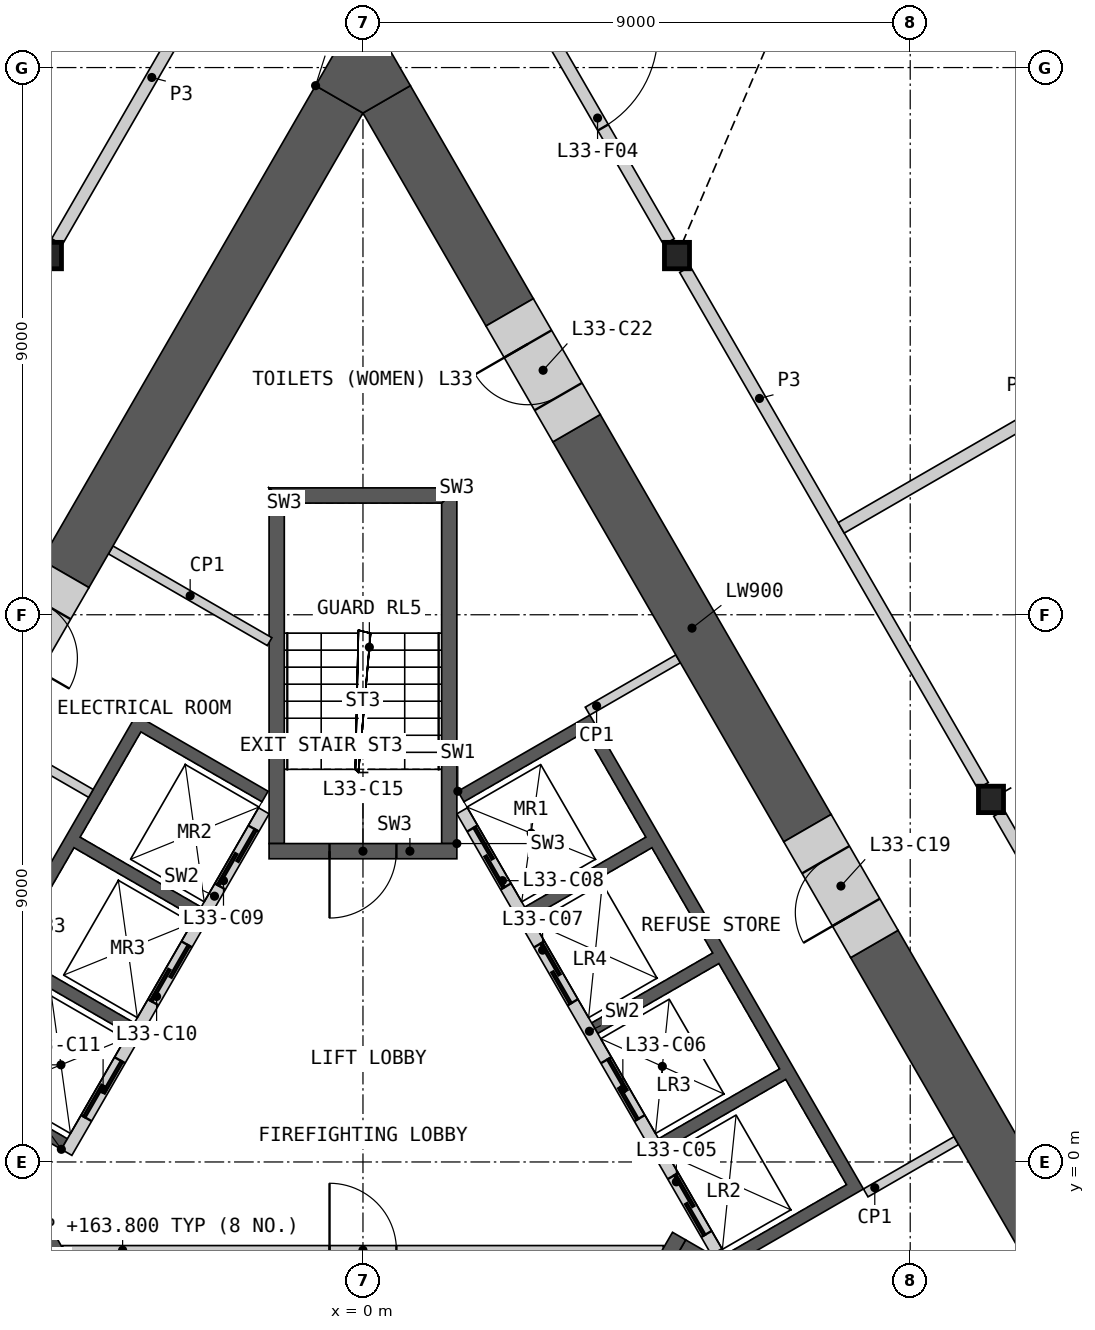
"""IFC4 building model, lengths in metres.
Left out: names, types, materials, properties, quantities, classifications, styles, units other than length and angle.
Written with IfcOpenShell. Run it as: python <this file> out.ifc"""

import sys

from ifc_helpers import new_model, si_unit, direction, frame, frame_2d, origin, origin_2d, place, context, subcontext, project, spatial, polyline, rectangle, i_section, outline, extrude, element, fill, save


model = new_model("IFC4")
c1 = context("Model", 3, precision=1e-05, world=origin(), true_north=direction((0.0, 1.0)))
c2 = subcontext(c1, "Body", "Model", "MODEL_VIEW")
j1 = project(units=[si_unit("LENGTHUNIT", "METRE"), si_unit("PLANEANGLEUNIT", "RADIAN")], contexts=[c1])
p1 = place(None, origin())
s1 = spatial("IfcSite", under=j1, at=p1, CompositionType="ELEMENT")
p2 = place(p1, origin())
s2 = spatial("IfcBuilding", under=s1, at=p2, CompositionType="ELEMENT")
p3 = place(p2, frame((0.0, 0.0, 154.2)))
s3 = spatial("IfcBuildingStorey", under=s2, at=p3, CompositionType="ELEMENT", Elevation=154.2)
for number, where, z_axis, x_axis in (
    (1, (-5.164, 14.908, 0.0), (0.0, 0.0, 1.0), (1.0, 0.0, 0.0)),
    (2, (10.328, 5.963, 0.0), (0.0, 0.0, 1.0), (1.0, 0.0, 0.0)),
    (3, (5.164, 14.908, 0.0), (0.0, 0.0, 1.0), (1.0, 0.0, 0.0)),
):
    element("IfcColumn", number, at=place(p3, frame(where, z_axis=z_axis, x_axis=x_axis)), inside=s3, PredefinedType="COLUMN", context=c2, shape_type="SweptSolid", body=[
        extrude(i_section(OverallWidth=0.412, OverallDepth=0.435, WebThickness=0.036, FlangeThickness=0.057, at=origin_2d()), origin(), (0.0, 0.0, 1.0), 10.0),
    ])
p4 = place(p3, origin())
e4 = element("IfcWall", 4, at=p4, inside=s3, PredefinedType="SHEAR", context=c2, shape_type="SweptSolid", body=[
    extrude(outline(polyline([(1.561, 6.097), (3.731, 7.35), (8.231, -0.444), (6.061, -1.697), (5.96, -1.524), (7.952, -0.374), (6.952, 1.358), (4.96, 0.208), (4.861, 0.381), (6.852, 1.531), (5.852, 3.263), (3.861, 2.113), (3.76, 2.287), (5.752, 3.437), (4.752, 5.169), (2.76, 4.019), (2.66, 4.192), (4.652, 5.342), (3.652, 7.074), (1.66, 5.924), (1.561, 6.097)])), origin(), (0.0, 0.0, 1.0), 9.6),
])
p5 = place(p3, frame((5.817, -1.476, 0.0), z_axis=(0.0, 0.0, 1.0), x_axis=(-0.500002616675, 0.866023893041, 0.0)))
e5 = element("IfcWall", 5, at=p5, inside=s3, PredefinedType="SOLIDWALL", context=c2, shape_type="SweptSolid", body=[
    extrude(rectangle(XDim=8.373, YDim=0.2, at=frame_2d((4.187, 0.0))), origin(), (0.0, 0.0, 1.0), 9.6),
])
p6 = place(p5, frame((0.337, 0.0, 0.0)))
e6 = element("IfcOpeningElement", 6, at=p6, cuts=e5, PredefinedType="OPENING", context=c2, shape_type="SweptSolid", body=[
    extrude(rectangle(XDim=1.1, YDim=2.1, at=frame_2d((0.55, 1.05))), frame((0.0, 0.11, 0.0), z_axis=(0.0, -1.0, 0.0), x_axis=(1.0, 0.0, 0.0)), (0.0, 0.0, 1.0), 0.22),
])
p7 = place(p5, frame((2.537, 0.0, 0.0)))
e7 = element("IfcOpeningElement", 7, at=p7, cuts=e5, PredefinedType="OPENING", context=c2, shape_type="SweptSolid", body=[
    extrude(rectangle(XDim=1.1, YDim=2.1, at=frame_2d((0.55, 1.05))), frame((0.0, 0.11, 0.0), z_axis=(0.0, -1.0, 0.0), x_axis=(1.0, 0.0, 0.0)), (0.0, 0.0, 1.0), 0.22),
])
p8 = place(p5, frame((4.737, 0.0, 0.0)))
e8 = element("IfcOpeningElement", 8, at=p8, cuts=e5, PredefinedType="OPENING", context=c2, shape_type="SweptSolid", body=[
    extrude(rectangle(XDim=1.1, YDim=2.1, at=frame_2d((0.55, 1.05))), frame((0.0, 0.11, 0.0), z_axis=(0.0, -1.0, 0.0), x_axis=(1.0, 0.0, 0.0)), (0.0, 0.0, 1.0), 0.22),
])
p9 = place(p5, frame((6.937, 0.0, 0.0)))
e9 = element("IfcOpeningElement", 9, at=p9, cuts=e5, PredefinedType="OPENING", context=c2, shape_type="SweptSolid", body=[
    extrude(rectangle(XDim=1.1, YDim=2.1, at=frame_2d((0.55, 1.05))), frame((0.0, 0.11, 0.0), z_axis=(0.0, -1.0, 0.0), x_axis=(1.0, 0.0, 0.0)), (0.0, 0.0, 1.0), 0.22),
])
p10 = place(p3, origin())
e10 = element("IfcWall", 10, at=p10, inside=s3, PredefinedType="SHEAR", context=c2, shape_type="SweptSolid", body=[
    extrude(outline(polyline([(-4.96, 0.208), (-7.131, 1.461), (-3.731, 7.35), (-1.561, 6.097), (-1.66, 5.924), (-3.652, 7.074), (-4.652, 5.342), (-2.66, 4.192), (-2.76, 4.019), (-4.752, 5.169), (-5.752, 3.437), (-3.76, 2.287), (-3.861, 2.113), (-5.852, 3.263), (-6.852, 1.531), (-4.861, 0.381), (-4.96, 0.208)])), origin(), (0.0, 0.0, 1.0), 9.6),
])
p11 = place(p3, frame((-1.631, 5.776, 0.0), z_axis=(0.0, 0.0, 1.0), x_axis=(-0.499992876559, -0.866029516466, 0.0)))
e11 = element("IfcWall", 11, at=p11, inside=s3, PredefinedType="SOLIDWALL", context=c2, shape_type="SweptSolid", body=[
    extrude(rectangle(XDim=6.486, YDim=0.2, at=frame_2d((3.243, 0.0))), origin(), (0.0, 0.0, 1.0), 9.6),
])
p12 = place(p11, frame((0.337, 0.0, 0.0)))
e12 = element("IfcOpeningElement", 12, at=p12, cuts=e11, PredefinedType="OPENING", context=c2, shape_type="SweptSolid", body=[
    extrude(rectangle(XDim=1.1, YDim=2.1, at=frame_2d((0.55, 1.05))), frame((0.0, 0.11, 0.0), z_axis=(0.0, -1.0, 0.0), x_axis=(1.0, 0.0, 0.0)), (0.0, 0.0, 1.0), 0.22),
])
p13 = place(p11, frame((2.537, 0.0, 0.0)))
e13 = element("IfcOpeningElement", 13, at=p13, cuts=e11, PredefinedType="OPENING", context=c2, shape_type="SweptSolid", body=[
    extrude(rectangle(XDim=1.1, YDim=2.1, at=frame_2d((0.55, 1.05))), frame((0.0, 0.11, 0.0), z_axis=(0.0, -1.0, 0.0), x_axis=(1.0, 0.0, 0.0)), (0.0, 0.0, 1.0), 0.22),
])
p14 = place(p11, frame((4.737, 0.0, 0.0)))
e14 = element("IfcOpeningElement", 14, at=p14, cuts=e11, PredefinedType="OPENING", context=c2, shape_type="SweptSolid", body=[
    extrude(rectangle(XDim=1.1, YDim=2.1, at=frame_2d((0.55, 1.05))), frame((0.0, 0.11, 0.0), z_axis=(0.0, -1.0, 0.0), x_axis=(1.0, 0.0, 0.0)), (0.0, 0.0, 1.0), 0.22),
])
p15 = place(p3, frame((-4.941, -1.45, 0.0), z_axis=(0.0, 0.0, 1.0), x_axis=(1.0, 0.0, 0.0)))
e15 = element("IfcWall", 15, at=p15, inside=s3, PredefinedType="PARTITIONING", context=c2, shape_type="SweptSolid", body=[
    extrude(rectangle(XDim=9.882, YDim=0.15, at=frame_2d((4.941, 0.0))), origin(), (0.0, 0.0, 1.0), 9.6),
])
p16 = place(p15, frame((4.391, 0.0, 0.0)))
e16 = element("IfcOpeningElement", 16, at=p16, cuts=e15, PredefinedType="OPENING", context=c2, shape_type="SweptSolid", body=[
    extrude(rectangle(XDim=1.1, YDim=2.1, at=frame_2d((0.55, 1.05))), frame((0.0, 0.085, 0.0), z_axis=(0.0, -1.0, 0.0), x_axis=(1.0, 0.0, 0.0)), (0.0, 0.0, 1.0), 0.17),
])
p17 = place(p3, frame((-5.199, -1.219, 0.0), z_axis=(0.0, 0.0, 1.0), x_axis=(0.499982516597, -0.866035497597, 0.0)))
e17 = element("IfcWall", 17, at=p17, inside=s3, PredefinedType="SHEAR", context=c2, shape_type="SweptSolid", body=[
    extrude(rectangle(XDim=3.088, YDim=0.25, at=frame_2d((1.544, 0.0))), origin(), (0.0, 0.0, 1.0), 9.6),
])
p18 = place(p17, frame((0.994, 0.0, 0.0)))
e18 = element("IfcOpeningElement", 18, at=p18, cuts=e17, PredefinedType="OPENING", context=c2, shape_type="SweptSolid", body=[
    extrude(rectangle(XDim=1.1, YDim=2.1, at=frame_2d((0.55, 1.05))), frame((0.0, 0.135, 0.0), z_axis=(0.0, -1.0, 0.0), x_axis=(1.0, 0.0, 0.0)), (0.0, 0.0, 1.0), 0.27),
])
p19 = place(p3, origin())
e19 = element("IfcWall", 19, at=p19, inside=s3, PredefinedType="SHEAR", context=c2, shape_type="SweptSolid", body=[
    extrude(outline(polyline([(10.032, -4.298), (10.374, -4.206), (5.307, -1.281), (5.182, -1.498), (10.032, -4.298)])), origin(), (0.0, 0.0, 1.0), 9.6),
])
p20 = place(p3, frame((3.655, -3.893, 0.0), z_axis=(0.0, 0.0, 1.0), x_axis=(0.499982516597, 0.866035497597, 0.0)))
e20 = element("IfcWall", 20, at=p20, inside=s3, PredefinedType="SHEAR", context=c2, shape_type="SweptSolid", body=[
    extrude(rectangle(XDim=3.088, YDim=0.25, at=frame_2d((1.544, 0.0))), origin(), (0.0, 0.0, 1.0), 9.6),
])
p21 = place(p20, frame((0.994, 0.0, 0.0)))
e21 = element("IfcOpeningElement", 21, at=p21, cuts=e20, PredefinedType="OPENING", context=c2, shape_type="SweptSolid", body=[
    extrude(rectangle(XDim=1.1, YDim=2.1, at=frame_2d((0.55, 1.05))), frame((0.0, 0.135, 0.0), z_axis=(0.0, -1.0, 0.0), x_axis=(1.0, 0.0, 0.0)), (0.0, 0.0, 1.0), 0.27),
])
p22 = place(p3, origin())
e22 = element("IfcWall", 22, at=p22, inside=s3, PredefinedType="SHEAR", context=c2, shape_type="SweptSolid", body=[
    extrude(outline(polyline([(1.544, 5.237), (1.544, 11.087), (1.294, 10.837), (1.294, 5.237), (1.544, 5.237)])), origin(), (0.0, 0.0, 1.0), 9.6),
])
p23 = place(p3, origin())
e23 = element("IfcWall", 23, at=p23, inside=s3, PredefinedType="SHEAR", context=c2, shape_type="SweptSolid", body=[
    extrude(outline(polyline([(1.544, 11.087), (-1.544, 11.087), (-1.294, 10.837), (1.294, 10.837), (1.544, 11.087)])), origin(), (0.0, 0.0, 1.0), 9.6),
])
p24 = place(p3, origin())
e24 = element("IfcWall", 24, at=p24, inside=s3, PredefinedType="SHEAR", context=c2, shape_type="SweptSolid", body=[
    extrude(outline(polyline([(-1.294, 10.837), (-1.544, 11.087), (-1.544, 5.237), (-1.294, 5.237), (-1.294, 10.837)])), origin(), (0.0, 0.0, 1.0), 9.6),
])
p25 = place(p3, frame((1.544, 5.112, 0.0), z_axis=(0.0, 0.0, 1.0), x_axis=(-1.0, 0.0, 0.0)))
e25 = element("IfcWall", 25, at=p25, inside=s3, PredefinedType="SHEAR", context=c2, shape_type="SweptSolid", body=[
    extrude(rectangle(XDim=3.088, YDim=0.25, at=frame_2d((1.544, 0.0))), origin(), (0.0, 0.0, 1.0), 9.6),
])
p26 = place(p25, frame((0.994, 0.0, 0.0)))
e26 = element("IfcOpeningElement", 26, at=p26, cuts=e25, PredefinedType="OPENING", context=c2, shape_type="SweptSolid", body=[
    extrude(rectangle(XDim=1.1, YDim=2.1, at=frame_2d((0.55, 1.05))), frame((0.0, 0.135, 0.0), z_axis=(0.0, -1.0, 0.0), x_axis=(1.0, 0.0, 0.0)), (0.0, 0.0, 1.0), 0.27),
])
for number, where, z_axis, x_axis in (
    (27, (3.693, 7.415, 0.0), (0.0, 0.0, 1.0), (0.866, 0.5, 0.0)),
    (28, (8.268, -0.509, 0.0), (0.0, 0.0, 1.0), (0.866, 0.5, 0.0)),
    (29, (-5.964, 6.922, 0.0), (0.0, 0.0, 1.0), (0.866, -0.5, 0.0)),
):
    element("IfcWall", number, at=place(p3, frame(where, z_axis=z_axis, x_axis=x_axis)), inside=s3, PredefinedType="PARTITIONING", context=c2, shape_type="SweptSolid", body=[
        extrude(rectangle(XDim=1.72, YDim=0.15, at=frame_2d((0.86, 0.0))), origin(), (0.0, 0.0, 1.0), 9.6),
    ])
p27 = place(p3, frame((-4.149, 10.067, 0.0), z_axis=(0.0, 0.0, 1.0), x_axis=(0.865988872794, -0.500063268193, 0.0)))
e30 = element("IfcWall", 30, at=p27, inside=s3, PredefinedType="PARTITIONING", context=c2, shape_type="SweptSolid", body=[
    extrude(rectangle(XDim=3.018, YDim=0.15, at=frame_2d((1.509, 0.0))), origin(), (0.0, 0.0, 1.0), 9.6),
])
p28 = place(p3, frame((15.331, -8.401, 0.0), z_axis=(0.0, 0.0, 1.0), x_axis=(-0.499990163897, 0.866031082587, 0.0)))
e31 = element("IfcWall", 31, at=p28, inside=s3, PredefinedType="SHEAR", context=c2, shape_type="SweptSolid", body=[
    extrude(rectangle(XDim=13.841, YDim=0.9, at=frame_2d((6.92, 0.0))), origin(), (0.0, 0.0, 1.0), 9.6),
])
p29 = place(p3, frame((7.31, 5.491, 0.0), z_axis=(0.0, 0.0, 1.0), x_axis=(-0.499996970966, 0.866027152591, 0.0)))
e32 = element("IfcWall", 32, at=p29, inside=s3, PredefinedType="SHEAR", context=c2, shape_type="SweptSolid", body=[
    extrude(rectangle(XDim=7.596, YDim=0.9, at=frame_2d((3.798, 0.0))), origin(), (0.0, 0.0, 1.0), 9.6),
])
p30 = place(p3, frame((2.413, 13.974, 0.0), z_axis=(0.0, 0.0, 1.0), x_axis=(-0.500046330384, 0.865998653272, 0.0)))
e33 = element("IfcWall", 33, at=p30, inside=s3, PredefinedType="SHEAR", context=c2, shape_type="SweptSolid", body=[
    extrude(rectangle(XDim=4.045, YDim=0.9, at=frame_2d((2.023, 0.0))), origin(), (0.0, 0.0, 1.0), 9.6),
])
p31 = place(p3, frame((-0.39, 17.478, 0.0), z_axis=(0.0, 0.0, 1.0), x_axis=(-0.499999130374, -0.866025905863, 0.0)))
e34 = element("IfcWall", 34, at=p31, inside=s3, PredefinedType="SHEAR", context=c2, shape_type="SweptSolid", body=[
    extrude(rectangle(XDim=9.013, YDim=0.9, at=frame_2d((4.507, 0.0))), origin(), (0.0, 0.0, 1.0), 9.6),
])
p32 = place(p3, origin())
e35 = element("IfcWall", 35, at=p32, inside=s3, PredefinedType="SHEAR", context=c2, shape_type="SweptSolid", body=[
    extrude(outline(polyline([(-0.779, 17.703), (0.0, 19.052), (0.779, 17.703), (0.0, 17.253), (-0.779, 17.703)])), origin(), (0.0, 0.0, 1.0), 9.6),
])
p33 = place(p3, frame((8.41, 3.585, 0.0), z_axis=(0.0, 0.0, 1.0), x_axis=(-0.50002983664, 0.866008176907, 0.0)))
e36 = element("IfcWall", 36, at=p33, inside=s3, PredefinedType="SHEAR", context=c2, shape_type="SweptSolid", body=[
    extrude(rectangle(XDim=2.2, YDim=0.9, at=frame_2d((1.1, 0.0))), origin(), (0.0, 0.0, 1.0), 9.6),
])
p34 = place(p33, frame((0.6, 0.0, 0.0)))
e37 = element("IfcOpeningElement", 37, at=p34, cuts=e36, PredefinedType="OPENING", context=c2, shape_type="SweptSolid", body=[
    extrude(rectangle(XDim=1.0, YDim=2.1, at=frame_2d((0.5, 1.05))), frame((0.0, 0.46, 0.0), z_axis=(0.0, -1.0, 0.0), x_axis=(1.0, 0.0, 0.0)), (0.0, 0.0, 1.0), 0.92),
])
p35 = place(p3, frame((-4.896, 9.672, 0.0), z_axis=(0.0, 0.0, 1.0), x_axis=(-0.50002983664, -0.866008176907, 0.0)))
e38 = element("IfcWall", 38, at=p35, inside=s3, PredefinedType="SHEAR", context=c2, shape_type="SweptSolid", body=[
    extrude(rectangle(XDim=2.2, YDim=0.9, at=frame_2d((1.1, 0.0))), origin(), (0.0, 0.0, 1.0), 9.6),
])
p36 = place(p35, frame((0.6, 0.0, 0.0)))
e39 = element("IfcOpeningElement", 39, at=p36, cuts=e38, PredefinedType="OPENING", context=c2, shape_type="SweptSolid", body=[
    extrude(rectangle(XDim=1.0, YDim=2.1, at=frame_2d((0.5, 1.05))), frame((0.0, 0.46, 0.0), z_axis=(0.0, -1.0, 0.0), x_axis=(1.0, 0.0, 0.0)), (0.0, 0.0, 1.0), 0.92),
])
p37 = place(p3, frame((3.512, 12.069, 0.0), z_axis=(0.0, 0.0, 1.0), x_axis=(-0.499946605688, 0.86605622881, 0.0)))
e40 = element("IfcWall", 40, at=p37, inside=s3, PredefinedType="SHEAR", context=c2, shape_type="SweptSolid", body=[
    extrude(rectangle(XDim=2.2, YDim=0.9, at=frame_2d((1.1, 0.0))), origin(), (0.0, 0.0, 1.0), 9.6),
])
p38 = place(p37, frame((0.6, 0.0, 0.0)))
e41 = element("IfcOpeningElement", 41, at=p38, cuts=e40, PredefinedType="OPENING", context=c2, shape_type="SweptSolid", body=[
    extrude(rectangle(XDim=1.0, YDim=2.1, at=frame_2d((0.5, 1.05))), frame((0.0, 0.46, 0.0), z_axis=(0.0, -1.0, 0.0), x_axis=(1.0, 0.0, 0.0)), (0.0, 0.0, 1.0), 0.92),
])
p39 = place(p3, frame((10.46, 5.736, 0.0), z_axis=(0.0, 0.0, 1.0), x_axis=(0.500004141693, -0.866023012564, 0.0)))
e42 = element("IfcWall", 42, at=p39, inside=s3, PredefinedType="PARTITIONING", context=c2, shape_type="SweptSolid", body=[
    extrude(rectangle(XDim=9.803, YDim=0.2, at=frame_2d((4.902, 0.0))), origin(), (0.0, 0.0, 1.0), 9.6),
])
p40 = place(p39, frame((3.952, 0.0, 0.0)))
e43 = element("IfcOpeningElement", 43, at=p40, cuts=e42, PredefinedType="OPENING", context=c2, shape_type="SweptSolid", body=[
    extrude(rectangle(XDim=1.8, YDim=2.1, at=frame_2d((0.9, 1.05))), frame((0.0, 0.11, 0.0), z_axis=(0.0, -1.0, 0.0), x_axis=(1.0, 0.0, 0.0)), (0.0, 0.0, 1.0), 0.22),
])
p41 = place(p3, frame((5.295, 14.68, 0.0), z_axis=(0.0, 0.0, 1.0), x_axis=(0.500012035596, -0.866018454918, 0.0)))
e44 = element("IfcWall", 44, at=p41, inside=s3, PredefinedType="PARTITIONING", context=c2, shape_type="SweptSolid", body=[
    extrude(rectangle(XDim=9.803, YDim=0.2, at=frame_2d((4.902, 0.0))), origin(), (0.0, 0.0, 1.0), 9.6),
])
p42 = place(p3, frame((-5.033, 15.135, 0.0), z_axis=(0.0, 0.0, 1.0), x_axis=(0.499980978912, 0.866036385336, 0.0)))
e45 = element("IfcWall", 45, at=p42, inside=s3, PredefinedType="PARTITIONING", context=c2, shape_type="SweptSolid", body=[
    extrude(rectangle(XDim=6.24, YDim=0.2, at=frame_2d((3.12, 0.0))), origin(), (0.0, 0.0, 1.0), 9.6),
])
p43 = place(p3, frame((1.913, 20.539, 0.0), z_axis=(0.0, 0.0, 1.0), x_axis=(0.499980978912, -0.866036385336, 0.0)))
e46 = element("IfcWall", 46, at=p43, inside=s3, PredefinedType="PARTITIONING", context=c2, shape_type="SweptSolid", body=[
    extrude(rectangle(XDim=6.24, YDim=0.2, at=frame_2d((3.12, 0.0))), origin(), (0.0, 0.0, 1.0), 9.6),
])
p44 = place(p43, frame((2.271, 0.0, 0.0)))
e47 = element("IfcOpeningElement", 47, at=p44, cuts=e46, PredefinedType="OPENING", context=c2, shape_type="SweptSolid", body=[
    extrude(rectangle(XDim=1.8, YDim=2.1, at=frame_2d((0.9, 1.05))), frame((0.0, 0.11, 0.0), z_axis=(0.0, -1.0, 0.0), x_axis=(1.0, 0.0, 0.0)), (0.0, 0.0, 1.0), 0.22),
])
p45 = place(p3, frame((7.865, 10.43, 0.0), z_axis=(0.0, 0.0, 1.0), x_axis=(0.866025675355, 0.499999529627, 0.0)))
e48 = element("IfcWall", 48, at=p45, inside=s3, PredefinedType="PARTITIONING", context=c2, shape_type="SweptSolid", body=[
    extrude(rectangle(XDim=7.373, YDim=0.2, at=frame_2d((3.687, 0.0))), origin(), (0.0, 0.0, 1.0), 8.685),
])
p46 = place(p6, origin())
e49 = element("IfcDoor", 49, at=p46, inside=s3, OperationType="SLIDING_TO_LEFT", PredefinedType="DOOR", context=c2, shape_type="SweptSolid", body=[
    extrude(rectangle(XDim=1.1, YDim=2.1, at=frame_2d((0.55, 1.05))), frame((0.0, 0.025, 0.0), z_axis=(0.0, -1.0, 0.0), x_axis=(1.0, 0.0, 0.0)), (0.0, 0.0, 1.0), 0.05),
])
fill(e6, e49)
p47 = place(p7, origin())
e50 = element("IfcDoor", 50, at=p47, inside=s3, OperationType="SLIDING_TO_LEFT", PredefinedType="DOOR", context=c2, shape_type="SweptSolid", body=[
    extrude(rectangle(XDim=1.1, YDim=2.1, at=frame_2d((0.55, 1.05))), frame((0.0, 0.025, 0.0), z_axis=(0.0, -1.0, 0.0), x_axis=(1.0, 0.0, 0.0)), (0.0, 0.0, 1.0), 0.05),
])
fill(e7, e50)
p48 = place(p8, origin())
e51 = element("IfcDoor", 51, at=p48, inside=s3, OperationType="SLIDING_TO_LEFT", PredefinedType="DOOR", context=c2, shape_type="SweptSolid", body=[
    extrude(rectangle(XDim=1.1, YDim=2.1, at=frame_2d((0.55, 1.05))), frame((0.0, 0.025, 0.0), z_axis=(0.0, -1.0, 0.0), x_axis=(1.0, 0.0, 0.0)), (0.0, 0.0, 1.0), 0.05),
])
fill(e8, e51)
p49 = place(p9, origin())
e52 = element("IfcDoor", 52, at=p49, inside=s3, OperationType="SLIDING_TO_LEFT", PredefinedType="DOOR", context=c2, shape_type="SweptSolid", body=[
    extrude(rectangle(XDim=1.1, YDim=2.1, at=frame_2d((0.55, 1.05))), frame((0.0, 0.025, 0.0), z_axis=(0.0, -1.0, 0.0), x_axis=(1.0, 0.0, 0.0)), (0.0, 0.0, 1.0), 0.05),
])
fill(e9, e52)
p50 = place(p12, origin())
e53 = element("IfcDoor", 53, at=p50, inside=s3, OperationType="SLIDING_TO_LEFT", PredefinedType="DOOR", context=c2, shape_type="SweptSolid", body=[
    extrude(rectangle(XDim=1.1, YDim=2.1, at=frame_2d((0.55, 1.05))), frame((0.0, 0.025, 0.0), z_axis=(0.0, -1.0, 0.0), x_axis=(1.0, 0.0, 0.0)), (0.0, 0.0, 1.0), 0.05),
])
fill(e12, e53)
p51 = place(p13, origin())
e54 = element("IfcDoor", 54, at=p51, inside=s3, OperationType="SLIDING_TO_LEFT", PredefinedType="DOOR", context=c2, shape_type="SweptSolid", body=[
    extrude(rectangle(XDim=1.1, YDim=2.1, at=frame_2d((0.55, 1.05))), frame((0.0, 0.025, 0.0), z_axis=(0.0, -1.0, 0.0), x_axis=(1.0, 0.0, 0.0)), (0.0, 0.0, 1.0), 0.05),
])
fill(e13, e54)
p52 = place(p14, origin())
e55 = element("IfcDoor", 55, at=p52, inside=s3, OperationType="SLIDING_TO_LEFT", PredefinedType="DOOR", context=c2, shape_type="SweptSolid", body=[
    extrude(rectangle(XDim=1.1, YDim=2.1, at=frame_2d((0.55, 1.05))), frame((0.0, 0.025, 0.0), z_axis=(0.0, -1.0, 0.0), x_axis=(1.0, 0.0, 0.0)), (0.0, 0.0, 1.0), 0.05),
])
fill(e14, e55)
p53 = place(p16, origin())
e56 = element("IfcDoor", 56, at=p53, inside=s3, OperationType="SINGLE_SWING_LEFT", PredefinedType="DOOR", context=c2, shape_type="SweptSolid", body=[
    extrude(rectangle(XDim=1.1, YDim=2.1, at=frame_2d((0.55, 1.05))), frame((0.0, 0.025, 0.0), z_axis=(0.0, -1.0, 0.0), x_axis=(1.0, 0.0, 0.0)), (0.0, 0.0, 1.0), 0.05),
])
fill(e16, e56)
p54 = place(p26, origin())
e57 = element("IfcDoor", 57, at=p54, inside=s3, OperationType="SINGLE_SWING_RIGHT", PredefinedType="DOOR", context=c2, shape_type="SweptSolid", body=[
    extrude(rectangle(XDim=1.1, YDim=2.1, at=frame_2d((0.55, 1.05))), frame((0.0, 0.025, 0.0), z_axis=(0.0, -1.0, 0.0), x_axis=(1.0, 0.0, 0.0)), (0.0, 0.0, 1.0), 0.05),
])
fill(e26, e57)
p55 = place(p34, origin())
e58 = element("IfcDoor", 58, at=p55, inside=s3, OperationType="SINGLE_SWING_LEFT", PredefinedType="DOOR", context=c2, shape_type="SweptSolid", body=[
    extrude(rectangle(XDim=1.0, YDim=2.1, at=frame_2d((0.5, 1.05))), frame((0.0, 0.205, 0.0), z_axis=(0.0, -1.0, 0.0), x_axis=(1.0, 0.0, 0.0)), (0.0, 0.0, 1.0), 0.05),
])
fill(e37, e58)
p56 = place(p36, origin())
e59 = element("IfcDoor", 59, at=p56, inside=s3, OperationType="SINGLE_SWING_RIGHT", PredefinedType="DOOR", context=c2, shape_type="SweptSolid", body=[
    extrude(rectangle(XDim=1.0, YDim=2.1, at=frame_2d((0.5, 1.05))), frame((0.0, 0.205, 0.0), z_axis=(0.0, -1.0, 0.0), x_axis=(1.0, 0.0, 0.0)), (0.0, 0.0, 1.0), 0.05),
])
fill(e39, e59)
p57 = place(p38, origin())
e60 = element("IfcDoor", 60, at=p57, inside=s3, OperationType="SINGLE_SWING_RIGHT", PredefinedType="DOOR", context=c2, shape_type="SweptSolid", body=[
    extrude(rectangle(XDim=1.0, YDim=2.1, at=frame_2d((0.5, 1.05))), frame((0.0, 0.205, 0.0), z_axis=(0.0, -1.0, 0.0), x_axis=(1.0, 0.0, 0.0)), (0.0, 0.0, 1.0), 0.05),
])
fill(e41, e60)
p58 = place(p44, origin())
e61 = element("IfcDoor", 61, at=p58, inside=s3, OperationType="DOUBLE_DOOR_SINGLE_SWING", PredefinedType="DOOR", context=c2, shape_type="SweptSolid", body=[
    extrude(rectangle(XDim=1.8, YDim=2.1, at=frame_2d((0.9, 1.05))), frame((0.0, 0.025, 0.0), z_axis=(0.0, -1.0, 0.0), x_axis=(1.0, 0.0, 0.0)), (0.0, 0.0, 1.0), 0.05),
])
fill(e47, e61)
save(model, sys.argv[1])
